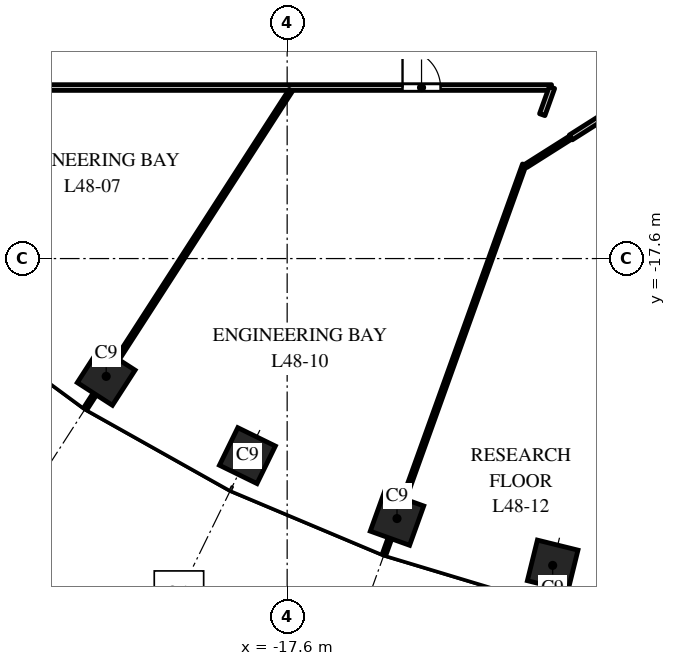
"""IFC4 building model, lengths in metres.
Left out: names, types, materials, properties, quantities, classifications, styles, units other than length and angle.
Written with IfcOpenShell. Run it as: python <this file> out.ifc"""

import sys

from ifc_helpers import new_model, si_unit, direction, frame, frame_2d, origin, origin_2d, place, context, subcontext, project, spatial, rectangle, extrude, element, fill, save


model = new_model("IFC4")
c1 = context("Model", 3, precision=1e-05, world=origin(), true_north=direction((0.0, 1.0)))
c2 = subcontext(c1, "Body", "Model", "MODEL_VIEW")
j1 = project(units=[si_unit("LENGTHUNIT", "METRE"), si_unit("PLANEANGLEUNIT", "RADIAN")], contexts=[c1])
p1 = place(None, origin())
s1 = spatial("IfcSite", under=j1, at=p1, CompositionType="ELEMENT")
p2 = place(p1, origin())
s2 = spatial("IfcBuilding", under=s1, at=p2, CompositionType="ELEMENT")
p3 = place(p2, frame((0.0, 0.0, 233.5)))
s3 = spatial("IfcBuildingStorey", under=s2, at=p3, CompositionType="ELEMENT", Elevation=233.5)
for number, where, z_axis, x_axis in (
    (1, (-22.362, -20.7, 0.0), (0.0, 0.0, 1.0), (0.84, -0.542, 0.0)),
    (2, (-18.646, -22.785, 0.0), (0.0, 0.0, 1.0), (0.898, -0.439, 0.0)),
    (3, (-14.709, -24.441, 0.0), (0.0, 0.0, 1.0), (0.941, -0.338, 0.0)),
    (4, (-10.613, -25.674, 0.0), (0.0, 0.0, 1.0), (0.971, -0.24, 0.0)),
):
    element("IfcColumn", number, at=place(p3, frame(where, z_axis=z_axis, x_axis=x_axis)), inside=s3, PredefinedType="COLUMN", context=c2, shape_type="SweptSolid", body=[
        extrude(rectangle(XDim=1.1, YDim=1.1, at=origin_2d()), origin(), (0.0, 0.0, 1.0), 4.0),
    ])
p4 = place(p3, frame((-24.0, -13.1, 0.0), z_axis=(0.0, 0.0, 1.0), x_axis=(1.0, 0.0, 0.0)))
e5 = element("IfcWall", 5, at=p4, inside=s3, PredefinedType="PARTITIONING", context=c2, shape_type="SweptSolid", body=[
    extrude(rectangle(XDim=13.357, YDim=0.15, at=frame_2d((6.678, 0.0))), origin(), (0.0, 0.0, 1.0), 2.75),
])
p5 = place(p4, frame((9.436, 0.0, 0.0)))
e6 = element("IfcOpeningElement", 6, at=p5, cuts=e5, PredefinedType="OPENING", context=c2, shape_type="SweptSolid", body=[
    extrude(rectangle(XDim=1.0, YDim=2.1, at=frame_2d((0.5, 1.05))), frame((0.0, 0.085, 0.0), z_axis=(0.0, -1.0, 0.0), x_axis=(1.0, 0.0, 0.0)), (0.0, 0.0, 1.0), 0.17),
])
p6 = place(p3, frame((-22.905, -21.542, 0.0), z_axis=(0.0, 0.0, 1.0), x_axis=(0.542277075573, 0.840199722273, 0.0)))
e7 = element("IfcWall", 7, at=p6, inside=s3, PredefinedType="PARTITIONING", context=c2, shape_type="SweptSolid", body=[
    extrude(rectangle(XDim=9.958, YDim=0.1, at=frame_2d((4.979, 0.0))), origin(), (0.0, 0.0, 1.0), 3.0),
])
p7 = place(p3, frame((-15.048, -25.383, 0.0), z_axis=(0.0, 0.0, 1.0), x_axis=(0.338406105684, 0.941000163462, 0.0)))
e8 = element("IfcWall", 8, at=p7, inside=s3, PredefinedType="PARTITIONING", context=c2, shape_type="SweptSolid", body=[
    extrude(rectangle(XDim=10.898, YDim=0.1, at=frame_2d((5.449, 0.0))), origin(), (0.0, 0.0, 1.0), 3.0),
])
p8 = place(p3, frame((-11.319, -15.161, 0.0), z_axis=(0.0, 0.0, 1.0), x_axis=(0.845102975348, 0.534603555037, 0.0)))
e9 = element("IfcWall", 9, at=p8, inside=s3, PredefinedType="PARTITIONING", context=c2, shape_type="SweptSolid", body=[
    extrude(rectangle(XDim=1.399, YDim=0.1, at=frame_2d((0.699, 0.0))), origin(), (0.0, 0.0, 1.0), 3.7),
])
p9 = place(p3, frame((-10.888, -13.814, 0.0), z_axis=(0.0, 0.0, 1.0), x_axis=(0.337396703232, 0.941362557492, 0.0)))
e10 = element("IfcWall", 10, at=p9, inside=s3, PredefinedType="PARTITIONING", context=c2, shape_type="SweptSolid", body=[
    extrude(rectangle(XDim=0.758, YDim=0.15, at=frame_2d((0.379, 0.0))), origin(), (0.0, 0.0, 1.0), 2.85),
])
p10 = place(p3, frame((-10.137, -14.413, 0.0), z_axis=(0.0, 0.0, 1.0), x_axis=(0.844665601723, 0.535294331434, 0.0)))
e11 = element("IfcWall", 11, at=p10, inside=s3, PredefinedType="PARTITIONING", context=c2, shape_type="SweptSolid", body=[
    extrude(rectangle(XDim=2.589, YDim=0.15, at=frame_2d((1.294, 0.0))), origin(), (0.0, 0.0, 1.0), 3.7),
])
p11 = place(p5, origin())
e12 = element("IfcDoor", 12, at=p11, inside=s3, OperationType="SINGLE_SWING_LEFT", PredefinedType="DOOR", context=c2, shape_type="SweptSolid", body=[
    extrude(rectangle(XDim=1.0, YDim=2.1, at=frame_2d((0.5, 1.05))), frame((0.0, 0.025, 0.0), z_axis=(0.0, -1.0, 0.0), x_axis=(1.0, 0.0, 0.0)), (0.0, 0.0, 1.0), 0.05),
])
fill(e6, e12)
save(model, sys.argv[1])
